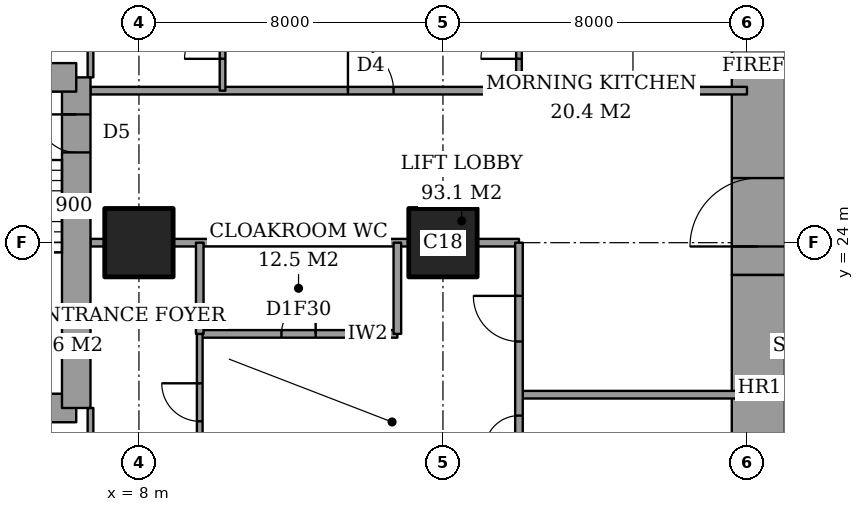
"""IFC4 building model, lengths in metres.
Left out: names, types, materials, properties, quantities, classifications, styles, units other than length and angle.
Written with IfcOpenShell. Run it as: python <this file> out.ifc"""

import sys

from ifc_helpers import new_model, si_unit, direction, frame, frame_2d, origin, origin_2d, place, context, subcontext, project, spatial, rectangle, extrude, element, fill, save


model = new_model("IFC4")
c1 = context("Model", 3, precision=1e-05, world=origin(), true_north=direction((0.0, 1.0)))
c2 = subcontext(c1, "Body", "Model", "MODEL_VIEW")
j1 = project(units=[si_unit("LENGTHUNIT", "METRE"), si_unit("PLANEANGLEUNIT", "RADIAN")], contexts=[c1])
p1 = place(None, origin())
s1 = spatial("IfcSite", under=j1, at=p1, CompositionType="ELEMENT")
p2 = place(p1, origin())
s2 = spatial("IfcBuilding", under=s1, at=p2, CompositionType="ELEMENT")
p3 = place(p2, frame((0.0, 0.0, 193.0)))
s3 = spatial("IfcBuildingStorey", under=s2, at=p3, CompositionType="ELEMENT", Elevation=193.0)
for number, where, z_axis, x_axis in (
    (1, (8.0, 24.0, 0.0), (0.0, 0.0, 1.0), (1.0, 0.0, 0.0)),
    (2, (16.0, 24.0, 0.0), (0.0, 0.0, 1.0), (1.0, 0.0, 0.0)),
):
    element("IfcColumn", number, at=place(p3, frame(where, z_axis=z_axis, x_axis=x_axis)), inside=s3, PredefinedType="COLUMN", context=c2, shape_type="SweptSolid", body=[
        extrude(rectangle(XDim=1.8, YDim=1.8, at=origin_2d()), origin(), (0.0, 0.0, 1.0), 3.6),
    ])
p4 = place(p3, frame((24.3, 13.0, 0.0), z_axis=(0.0, 0.0, 1.0), x_axis=(0.0, 1.0, 0.0)))
e3 = element("IfcWall", 3, at=p4, inside=s3, PredefinedType="SHEAR", context=c2, shape_type="SweptSolid", body=[
    extrude(rectangle(XDim=10.15, YDim=1.4, at=frame_2d((5.075, 0.0))), origin(), (0.0, 0.0, 1.0), 3.6),
])
p5 = place(p3, frame((24.3, 23.15, 0.0), z_axis=(0.0, 0.0, 1.0), x_axis=(0.0, 1.0, 0.0)))
e4 = element("IfcWall", 4, at=p5, inside=s3, PredefinedType="SHEAR", context=c2, shape_type="SweptSolid", body=[
    extrude(rectangle(XDim=11.85, YDim=1.4, at=frame_2d((5.925, 0.0))), origin(), (0.0, 0.0, 1.0), 3.6),
])
p6 = place(p5, frame((0.75, 0.0, 0.0)))
e5 = element("IfcOpeningElement", 5, at=p6, cuts=e4, PredefinedType="OPENING", context=c2, shape_type="SweptSolid", body=[
    extrude(rectangle(XDim=1.8, YDim=2.4, at=frame_2d((0.9, 1.2))), frame((0.0, 0.71, 0.0), z_axis=(0.0, -1.0, 0.0), x_axis=(1.0, 0.0, 0.0)), (0.0, 0.0, 1.0), 1.42),
])
p7 = place(p3, frame((1.9, 19.65, 0.0), z_axis=(0.0, 0.0, 1.0), x_axis=(1.0, 0.0, 0.0)))
e6 = element("IfcWall", 6, at=p7, inside=s3, PredefinedType="SHEAR", context=c2, shape_type="SweptSolid", body=[
    extrude(rectangle(XDim=4.45, YDim=0.75, at=frame_2d((2.225, 0.0))), origin(), (0.0, 0.0, 1.0), 3.6),
])
p8 = place(p3, frame((6.35, 19.65, 0.0), z_axis=(0.0, 0.0, 1.0), x_axis=(0.0, 1.0, 0.0)))
e7 = element("IfcWall", 7, at=p8, inside=s3, PredefinedType="SHEAR", context=c2, shape_type="SweptSolid", body=[
    extrude(rectangle(XDim=8.7, YDim=0.75, at=frame_2d((4.35, 0.0))), origin(), (0.0, 0.0, 1.0), 3.6),
])
p9 = place(p8, frame((6.725, 0.0, 0.0)))
e8 = element("IfcOpeningElement", 8, at=p9, cuts=e7, PredefinedType="OPENING", context=c2, shape_type="SweptSolid", body=[
    extrude(rectangle(XDim=1.0, YDim=2.1, at=frame_2d((0.5, 1.05))), frame((0.0, 0.385, 0.0), z_axis=(0.0, -1.0, 0.0), x_axis=(1.0, 0.0, 0.0)), (0.0, 0.0, 1.0), 0.77),
])
p10 = place(p3, frame((6.35, 28.35, 0.0), z_axis=(0.0, 0.0, 1.0), x_axis=(-1.0, 0.0, 0.0)))
e9 = element("IfcWall", 9, at=p10, inside=s3, PredefinedType="SHEAR", context=c2, shape_type="SweptSolid", body=[
    extrude(rectangle(XDim=4.45, YDim=0.75, at=frame_2d((2.225, 0.0))), origin(), (0.0, 0.0, 1.0), 3.6),
])
p11 = place(p3, frame((18.0, 20.0, 0.0), z_axis=(0.0, 0.0, 1.0), x_axis=(1.0, 0.0, 0.0)))
e10 = element("IfcWall", 10, at=p11, inside=s3, PredefinedType="PARTITIONING", context=c2, shape_type="SweptSolid", body=[
    extrude(rectangle(XDim=6.0, YDim=0.2, at=frame_2d((3.0, 0.0))), origin(), (0.0, 0.0, 1.0), 3.35),
])
p12 = place(p3, frame((9.6, 21.6, 0.0), z_axis=(0.0, 0.0, 1.0), x_axis=(1.0, 0.0, 0.0)))
e11 = element("IfcWall", 11, at=p12, inside=s3, PredefinedType="PARTITIONING", context=c2, shape_type="SweptSolid", body=[
    extrude(rectangle(XDim=5.2, YDim=0.2, at=frame_2d((2.6, 0.0))), origin(), (0.0, 0.0, 1.0), 3.35),
])
p13 = place(p12, frame((2.15, 0.0, 0.0)))
e12 = element("IfcOpeningElement", 12, at=p13, cuts=e11, PredefinedType="OPENING", context=c2, shape_type="SweptSolid", body=[
    extrude(rectangle(XDim=0.9, YDim=2.1, at=frame_2d((0.45, 1.05))), frame((0.0, 0.11, 0.0), z_axis=(0.0, -1.0, 0.0), x_axis=(1.0, 0.0, 0.0)), (0.0, 0.0, 1.0), 0.22),
])
p14 = place(p3, frame((6.725, 24.0, 0.0), z_axis=(0.0, 0.0, 1.0), x_axis=(1.0, 0.0, 0.0)))
e13 = element("IfcWall", 13, at=p14, inside=s3, PredefinedType="PARTITIONING", context=c2, shape_type="SweptSolid", body=[
    extrude(rectangle(XDim=0.375, YDim=0.2, at=frame_2d((0.188, 0.0))), origin(), (0.0, 0.0, 1.0), 3.35),
])
p15 = place(p3, frame((8.9, 24.0, 0.0), z_axis=(0.0, 0.0, 1.0), x_axis=(1.0, 0.0, 0.0)))
e14 = element("IfcWall", 14, at=p15, inside=s3, PredefinedType="PARTITIONING", context=c2, shape_type="SweptSolid", body=[
    extrude(rectangle(XDim=6.2, YDim=0.2, at=frame_2d((3.1, 0.0))), origin(), (0.0, 0.0, 1.0), 3.35),
])
p16 = place(p3, frame((16.9, 24.0, 0.0), z_axis=(0.0, 0.0, 1.0), x_axis=(1.0, 0.0, 0.0)))
e15 = element("IfcWall", 15, at=p16, inside=s3, PredefinedType="PARTITIONING", context=c2, shape_type="SweptSolid", body=[
    extrude(rectangle(XDim=1.1, YDim=0.2, at=frame_2d((0.55, 0.0))), origin(), (0.0, 0.0, 1.0), 3.35),
])
p17 = place(p3, frame((6.725, 28.0, 0.0), z_axis=(0.0, 0.0, 1.0), x_axis=(1.0, 0.0, 0.0)))
e16 = element("IfcWall", 16, at=p17, inside=s3, PredefinedType="PARTITIONING", context=c2, shape_type="SweptSolid", body=[
    extrude(rectangle(XDim=17.275, YDim=0.2, at=frame_2d((8.637, 0.0))), origin(), (0.0, 0.0, 1.0), 3.35),
])
p18 = place(p17, frame((6.775, 0.0, 0.0)))
e17 = element("IfcOpeningElement", 17, at=p18, cuts=e16, PredefinedType="OPENING", context=c2, shape_type="SweptSolid", body=[
    extrude(rectangle(XDim=1.2, YDim=2.4, at=frame_2d((0.6, 1.2))), frame((0.0, 0.11, 0.0), z_axis=(0.0, -1.0, 0.0), x_axis=(1.0, 0.0, 0.0)), (0.0, 0.0, 1.0), 0.22),
])
p19 = place(p3, frame((6.725, 17.2, 0.0), z_axis=(0.0, 0.0, 1.0), x_axis=(0.0, 1.0, 0.0)))
e18 = element("IfcWall", 18, at=p19, inside=s3, PredefinedType="PARTITIONING", context=c2, shape_type="SweptSolid", body=[
    extrude(rectangle(XDim=2.45, YDim=0.15, at=frame_2d((1.225, 0.0))), origin(), (0.0, 0.0, 1.0), 3.35),
])
p20 = place(p19, frame((0.587, 0.0, 0.0)))
e19 = element("IfcOpeningElement", 19, at=p20, cuts=e18, PredefinedType="OPENING", context=c2, shape_type="SweptSolid", body=[
    extrude(rectangle(XDim=0.9, YDim=2.1, at=frame_2d((0.45, 1.05))), frame((0.0, 0.085, 0.0), z_axis=(0.0, -1.0, 0.0), x_axis=(1.0, 0.0, 0.0)), (0.0, 0.0, 1.0), 0.17),
])
p21 = place(p3, frame((6.725, 28.35, 0.0), z_axis=(0.0, 0.0, 1.0), x_axis=(0.0, 1.0, 0.0)))
e20 = element("IfcWall", 20, at=p21, inside=s3, PredefinedType="PARTITIONING", context=c2, shape_type="SweptSolid", body=[
    extrude(rectangle(XDim=2.45, YDim=0.15, at=frame_2d((1.225, 0.0))), origin(), (0.0, 0.0, 1.0), 3.35),
])
p22 = place(p21, frame((0.962, 0.0, 0.0)))
e21 = element("IfcOpeningElement", 21, at=p22, cuts=e20, PredefinedType="OPENING", context=c2, shape_type="SweptSolid", body=[
    extrude(rectangle(XDim=0.9, YDim=2.1, at=frame_2d((0.45, 1.05))), frame((0.0, 0.085, 0.0), z_axis=(0.0, -1.0, 0.0), x_axis=(1.0, 0.0, 0.0)), (0.0, 0.0, 1.0), 0.17),
])
p23 = place(p3, frame((9.6, 21.6, 0.0), z_axis=(0.0, 0.0, 1.0), x_axis=(0.0, 1.0, 0.0)))
e22 = element("IfcWall", 22, at=p23, inside=s3, PredefinedType="PARTITIONING", context=c2, shape_type="SweptSolid", body=[
    extrude(rectangle(XDim=2.4, YDim=0.2, at=frame_2d((1.2, 0.0))), origin(), (0.0, 0.0, 1.0), 3.35),
])
p24 = place(p3, frame((9.6, 10.6, 0.0), z_axis=(0.0, 0.0, 1.0), x_axis=(0.0, 1.0, 0.0)))
e23 = element("IfcWall", 23, at=p24, inside=s3, PredefinedType="PARTITIONING", context=c2, shape_type="SweptSolid", body=[
    extrude(rectangle(XDim=11.0, YDim=0.15, at=frame_2d((5.5, 0.0))), origin(), (0.0, 0.0, 1.0), 3.35),
])
p25 = place(p24, frame((8.7, 0.0, 0.0)))
e24 = element("IfcOpeningElement", 24, at=p25, cuts=e23, PredefinedType="OPENING", context=c2, shape_type="SweptSolid", body=[
    extrude(rectangle(XDim=1.0, YDim=2.1, at=frame_2d((0.5, 1.05))), frame((0.0, 0.085, 0.0), z_axis=(0.0, -1.0, 0.0), x_axis=(1.0, 0.0, 0.0)), (0.0, 0.0, 1.0), 0.17),
])
p26 = place(p3, frame((10.2, 28.0, 0.0), z_axis=(0.0, 0.0, 1.0), x_axis=(0.0, 1.0, 0.0)))
e25 = element("IfcWall", 25, at=p26, inside=s3, PredefinedType="PARTITIONING", context=c2, shape_type="SweptSolid", body=[
    extrude(rectangle(XDim=9.4, YDim=0.15, at=frame_2d((4.7, 0.0))), origin(), (0.0, 0.0, 1.0), 3.35),
])
p27 = place(p26, frame((0.837, 0.0, 0.0)))
e26 = element("IfcOpeningElement", 26, at=p27, cuts=e25, PredefinedType="OPENING", context=c2, shape_type="SweptSolid", body=[
    extrude(rectangle(XDim=1.0, YDim=2.1, at=frame_2d((0.5, 1.05))), frame((0.0, 0.085, 0.0), z_axis=(0.0, -1.0, 0.0), x_axis=(1.0, 0.0, 0.0)), (0.0, 0.0, 1.0), 0.17),
])
p28 = place(p3, frame((14.8, 21.6, 0.0), z_axis=(0.0, 0.0, 1.0), x_axis=(0.0, 1.0, 0.0)))
e27 = element("IfcWall", 27, at=p28, inside=s3, PredefinedType="PARTITIONING", context=c2, shape_type="SweptSolid", body=[
    extrude(rectangle(XDim=2.4, YDim=0.2, at=frame_2d((1.2, 0.0))), origin(), (0.0, 0.0, 1.0), 3.35),
])
p29 = place(p3, frame((18.0, 18.0, 0.0), z_axis=(0.0, 0.0, 1.0), x_axis=(0.0, 1.0, 0.0)))
e28 = element("IfcWall", 28, at=p29, inside=s3, PredefinedType="PARTITIONING", context=c2, shape_type="SweptSolid", body=[
    extrude(rectangle(XDim=6.0, YDim=0.2, at=frame_2d((3.0, 0.0))), origin(), (0.0, 0.0, 1.0), 3.35),
])
p30 = place(p29, frame((3.4, 0.0, 0.0)))
e29 = element("IfcOpeningElement", 29, at=p30, cuts=e28, PredefinedType="OPENING", context=c2, shape_type="SweptSolid", body=[
    extrude(rectangle(XDim=1.2, YDim=2.4, at=frame_2d((0.6, 1.2))), frame((0.0, 0.11, 0.0), z_axis=(0.0, -1.0, 0.0), x_axis=(1.0, 0.0, 0.0)), (0.0, 0.0, 1.0), 0.22),
])
p31 = place(p29, frame((0.55, 0.0, 0.0)))
e30 = element("IfcOpeningElement", 30, at=p31, cuts=e28, PredefinedType="OPENING", context=c2, shape_type="SweptSolid", body=[
    extrude(rectangle(XDim=0.9, YDim=2.1, at=frame_2d((0.45, 1.05))), frame((0.0, 0.11, 0.0), z_axis=(0.0, -1.0, 0.0), x_axis=(1.0, 0.0, 0.0)), (0.0, 0.0, 1.0), 0.22),
])
p32 = place(p3, frame((18.0, 28.0, 0.0), z_axis=(0.0, 0.0, 1.0), x_axis=(0.0, 1.0, 0.0)))
e31 = element("IfcWall", 31, at=p32, inside=s3, PredefinedType="PARTITIONING", context=c2, shape_type="SweptSolid", body=[
    extrude(rectangle(XDim=9.4, YDim=0.15, at=frame_2d((4.7, 0.0))), origin(), (0.0, 0.0, 1.0), 3.35),
])
p33 = place(p32, frame((0.837, 0.0, 0.0)))
e32 = element("IfcOpeningElement", 32, at=p33, cuts=e31, PredefinedType="OPENING", context=c2, shape_type="SweptSolid", body=[
    extrude(rectangle(XDim=1.0, YDim=2.1, at=frame_2d((0.5, 1.05))), frame((0.0, 0.085, 0.0), z_axis=(0.0, -1.0, 0.0), x_axis=(1.0, 0.0, 0.0)), (0.0, 0.0, 1.0), 0.17),
])
p34 = place(p25, origin())
e33 = element("IfcDoor", 33, at=p34, inside=s3, OperationType="SINGLE_SWING_LEFT", PredefinedType="DOOR", context=c2, shape_type="SweptSolid", body=[
    extrude(rectangle(XDim=1.0, YDim=2.1, at=frame_2d((0.5, 1.05))), frame((0.0, 0.025, 0.0), z_axis=(0.0, -1.0, 0.0), x_axis=(1.0, 0.0, 0.0)), (0.0, 0.0, 1.0), 0.05),
])
fill(e24, e33)
p35 = place(p13, origin())
e34 = element("IfcDoor", 34, at=p35, inside=s3, OperationType="SINGLE_SWING_LEFT", PredefinedType="DOOR", context=c2, shape_type="SweptSolid", body=[
    extrude(rectangle(XDim=0.9, YDim=2.1, at=frame_2d((0.45, 1.05))), frame((0.0, 0.025, 0.0), z_axis=(0.0, -1.0, 0.0), x_axis=(1.0, 0.0, 0.0)), (0.0, 0.0, 1.0), 0.05),
])
fill(e12, e34)
p36 = place(p30, origin())
e35 = element("IfcDoor", 35, at=p36, inside=s3, OperationType="SINGLE_SWING_LEFT", PredefinedType="DOOR", context=c2, shape_type="SweptSolid", body=[
    extrude(rectangle(XDim=1.2, YDim=2.4, at=frame_2d((0.6, 1.2))), frame((0.0, 0.025, 0.0), z_axis=(0.0, -1.0, 0.0), x_axis=(1.0, 0.0, 0.0)), (0.0, 0.0, 1.0), 0.05),
])
fill(e29, e35)
p37 = place(p31, origin())
e36 = element("IfcDoor", 36, at=p37, inside=s3, OperationType="SINGLE_SWING_RIGHT", PredefinedType="DOOR", context=c2, shape_type="SweptSolid", body=[
    extrude(rectangle(XDim=0.9, YDim=2.1, at=frame_2d((0.45, 1.05))), frame((0.0, 0.025, 0.0), z_axis=(0.0, -1.0, 0.0), x_axis=(1.0, 0.0, 0.0)), (0.0, 0.0, 1.0), 0.05),
])
fill(e30, e36)
p38 = place(p27, origin())
e37 = element("IfcDoor", 37, at=p38, inside=s3, OperationType="SINGLE_SWING_RIGHT", PredefinedType="DOOR", context=c2, shape_type="SweptSolid", body=[
    extrude(rectangle(XDim=1.0, YDim=2.1, at=frame_2d((0.5, 1.05))), frame((0.0, 0.025, 0.0), z_axis=(0.0, -1.0, 0.0), x_axis=(1.0, 0.0, 0.0)), (0.0, 0.0, 1.0), 0.05),
])
fill(e26, e37)
p39 = place(p18, origin())
e38 = element("IfcDoor", 38, at=p39, inside=s3, OperationType="SINGLE_SWING_RIGHT", PredefinedType="DOOR", context=c2, shape_type="SweptSolid", body=[
    extrude(rectangle(XDim=1.2, YDim=2.4, at=frame_2d((0.6, 1.2))), frame((0.0, 0.025, 0.0), z_axis=(0.0, -1.0, 0.0), x_axis=(1.0, 0.0, 0.0)), (0.0, 0.0, 1.0), 0.05),
])
fill(e17, e38)
p40 = place(p33, origin())
e39 = element("IfcDoor", 39, at=p40, inside=s3, OperationType="SINGLE_SWING_RIGHT", PredefinedType="DOOR", context=c2, shape_type="SweptSolid", body=[
    extrude(rectangle(XDim=1.0, YDim=2.1, at=frame_2d((0.5, 1.05))), frame((0.0, 0.025, 0.0), z_axis=(0.0, -1.0, 0.0), x_axis=(1.0, 0.0, 0.0)), (0.0, 0.0, 1.0), 0.05),
])
fill(e32, e39)
p41 = place(p6, origin())
e40 = element("IfcDoor", 40, at=p41, inside=s3, OperationType="DOUBLE_DOOR_DOUBLE_SWING", PredefinedType="DOOR", context=c2, shape_type="SweptSolid", body=[
    extrude(rectangle(XDim=1.8, YDim=2.4, at=frame_2d((0.9, 1.2))), frame((0.0, 0.025, 0.0), z_axis=(0.0, -1.0, 0.0), x_axis=(1.0, 0.0, 0.0)), (0.0, 0.0, 1.0), 0.05),
])
fill(e5, e40)
p42 = place(p9, origin())
e41 = element("IfcDoor", 41, at=p42, inside=s3, OperationType="SINGLE_SWING_LEFT", PredefinedType="DOOR", context=c2, shape_type="SweptSolid", body=[
    extrude(rectangle(XDim=1.0, YDim=2.1, at=frame_2d((0.5, 1.05))), frame((0.0, 0.025, 0.0), z_axis=(0.0, -1.0, 0.0), x_axis=(1.0, 0.0, 0.0)), (0.0, 0.0, 1.0), 0.05),
])
fill(e8, e41)
save(model, sys.argv[1])
